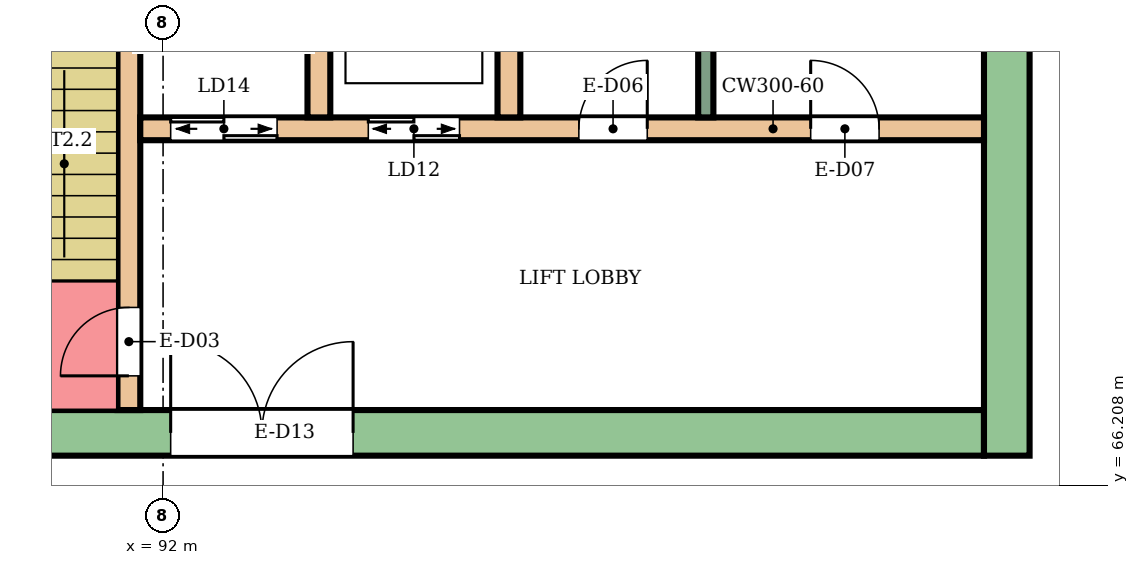
"""IFC4 building model, lengths in metres.
Left out: names, types, materials, properties, quantities, classifications, styles, units other than length and angle.
Written with IfcOpenShell. Run it as: python <this file> out.ifc"""

import sys

from ifc_helpers import new_model, si_unit, direction, frame, frame_2d, origin, place, context, subcontext, project, spatial, rectangle, extrude, element, fill, save


model = new_model("IFC4")
c1 = context("Model", 3, precision=1e-05, world=origin(), true_north=direction((0.0, 1.0)))
c2 = subcontext(c1, "Body", "Model", "MODEL_VIEW")
j1 = project(units=[si_unit("LENGTHUNIT", "METRE"), si_unit("PLANEANGLEUNIT", "RADIAN")], contexts=[c1])
p1 = place(None, origin())
s1 = spatial("IfcSite", under=j1, at=p1, CompositionType="ELEMENT")
p2 = place(p1, origin())
s2 = spatial("IfcBuilding", under=s1, at=p2, CompositionType="ELEMENT")
p3 = place(p2, frame((0.0, 0.0, 254.1)))
s3 = spatial("IfcBuildingStorey", under=s2, at=p3, CompositionType="ELEMENT", Elevation=254.1)
p4 = place(p3, frame((87.9, 66.9, 0.0), z_axis=(0.0, 0.0, 1.0), x_axis=(1.0, 0.0, 0.0)))
e1 = element("IfcWall", 1, at=p4, inside=s3, PredefinedType="SHEAR", context=c2, shape_type="SweptSolid", body=[
    extrude(rectangle(XDim=14.9, YDim=0.6, at=frame_2d((7.45, 0.0))), origin(), (0.0, 0.0, 1.0), 3.88),
])
p5 = place(p4, frame((4.2, 0.0, 0.0)))
e2 = element("IfcOpeningElement", 2, at=p5, cuts=e1, PredefinedType="OPENING", context=c2, shape_type="SweptSolid", body=[
    extrude(rectangle(XDim=2.4, YDim=2.4, at=frame_2d((1.2, 1.2))), frame((0.0, 0.31, 0.0), z_axis=(0.0, -1.0, 0.0), x_axis=(1.0, 0.0, 0.0)), (0.0, 0.0, 1.0), 0.62),
])
p6 = place(p3, frame((103.1, 66.6, 0.0), z_axis=(0.0, 0.0, 1.0), x_axis=(0.0, 1.0, 0.0)))
e3 = element("IfcWall", 3, at=p6, inside=s3, PredefinedType="SHEAR", context=c2, shape_type="SweptSolid", body=[
    extrude(rectangle(XDim=16.8, YDim=0.6, at=frame_2d((8.4, 0.0))), origin(), (0.0, 0.0, 1.0), 3.88),
])
p7 = place(p3, frame((91.55, 67.2, 0.0), z_axis=(0.0, 0.0, 1.0), x_axis=(0.0, 1.0, 0.0)))
e4 = element("IfcWall", 4, at=p7, inside=s3, PredefinedType="SHEAR", context=c2, shape_type="SweptSolid", body=[
    extrude(rectangle(XDim=7.8, YDim=0.3, at=frame_2d((3.9, 0.0))), origin(), (0.0, 0.0, 1.0), 3.88),
])
p8 = place(p7, frame((0.45, 0.0, 0.0)))
e5 = element("IfcOpeningElement", 5, at=p8, cuts=e4, PredefinedType="OPENING", context=c2, shape_type="SweptSolid", body=[
    extrude(rectangle(XDim=0.9, YDim=2.1, at=frame_2d((0.45, 1.05))), frame((0.0, 0.16, 0.0), z_axis=(0.0, -1.0, 0.0), x_axis=(1.0, 0.0, 0.0)), (0.0, 0.0, 1.0), 0.32),
])
p9 = place(p3, frame((91.7, 70.9, 0.0), z_axis=(0.0, 0.0, 1.0), x_axis=(1.0, 0.0, 0.0)))
e6 = element("IfcWall", 6, at=p9, inside=s3, PredefinedType="SHEAR", context=c2, shape_type="SweptSolid", body=[
    extrude(rectangle(XDim=11.1, YDim=0.3, at=frame_2d((5.55, 0.0))), origin(), (0.0, 0.0, 1.0), 3.88),
])
p10 = place(p9, frame((0.4, 0.0, 0.0)))
e7 = element("IfcOpeningElement", 7, at=p10, cuts=e6, PredefinedType="OPENING", context=c2, shape_type="SweptSolid", body=[
    extrude(rectangle(XDim=1.4, YDim=2.1, at=frame_2d((0.7, 1.05))), frame((0.0, 0.16, 0.0), z_axis=(0.0, -1.0, 0.0), x_axis=(1.0, 0.0, 0.0)), (0.0, 0.0, 1.0), 0.32),
])
p11 = place(p9, frame((3.0, 0.0, 0.0)))
e8 = element("IfcOpeningElement", 8, at=p11, cuts=e6, PredefinedType="OPENING", context=c2, shape_type="SweptSolid", body=[
    extrude(rectangle(XDim=1.2, YDim=2.1, at=frame_2d((0.6, 1.05))), frame((0.0, 0.16, 0.0), z_axis=(0.0, -1.0, 0.0), x_axis=(1.0, 0.0, 0.0)), (0.0, 0.0, 1.0), 0.32),
])
p12 = place(p9, frame((5.77, 0.0, 0.0)))
e9 = element("IfcOpeningElement", 9, at=p12, cuts=e6, PredefinedType="OPENING", context=c2, shape_type="SweptSolid", body=[
    extrude(rectangle(XDim=0.9, YDim=2.1, at=frame_2d((0.45, 1.05))), frame((0.0, 0.16, 0.0), z_axis=(0.0, -1.0, 0.0), x_axis=(1.0, 0.0, 0.0)), (0.0, 0.0, 1.0), 0.32),
])
p13 = place(p9, frame((8.82, 0.0, 0.0)))
e10 = element("IfcOpeningElement", 10, at=p13, cuts=e6, PredefinedType="OPENING", context=c2, shape_type="SweptSolid", body=[
    extrude(rectangle(XDim=0.9, YDim=2.1, at=frame_2d((0.45, 1.05))), frame((0.0, 0.16, 0.0), z_axis=(0.0, -1.0, 0.0), x_axis=(1.0, 0.0, 0.0)), (0.0, 0.0, 1.0), 0.32),
])
for number, where, z_axis, x_axis in (
    (11, (94.05, 71.05, 0.0), (0.0, 0.0, 1.0), (0.0, 1.0, 0.0)),
    (12, (96.55, 71.05, 0.0), (0.0, 0.0, 1.0), (0.0, 1.0, 0.0)),
):
    element("IfcWall", number, at=place(p3, frame(where, z_axis=z_axis, x_axis=x_axis)), inside=s3, PredefinedType="SHEAR", context=c2, shape_type="SweptSolid", body=[
        extrude(rectangle(XDim=2.55, YDim=0.3, at=frame_2d((1.275, 0.0))), origin(), (0.0, 0.0, 1.0), 3.88),
    ])
p14 = place(p3, frame((99.14, 71.05, 0.0), z_axis=(0.0, 0.0, 1.0), x_axis=(0.0, 1.0, 0.0)))
e13 = element("IfcWall", 13, at=p14, inside=s3, PredefinedType="PARTITIONING", context=c2, shape_type="SweptSolid", body=[
    extrude(rectangle(XDim=2.55, YDim=0.2, at=frame_2d((1.275, 0.0))), origin(), (0.0, 0.0, 1.0), 3.88),
])
p15 = place(p8, origin())
e14 = element("IfcDoor", 14, at=p15, inside=s3, OperationType="SINGLE_SWING_LEFT", PredefinedType="DOOR", context=c2, shape_type="SweptSolid", body=[
    extrude(rectangle(XDim=0.9, YDim=2.1, at=frame_2d((0.45, 1.05))), frame((0.0, 0.025, 0.0), z_axis=(0.0, -1.0, 0.0), x_axis=(1.0, 0.0, 0.0)), (0.0, 0.0, 1.0), 0.05),
])
fill(e5, e14)
p16 = place(p10, origin())
e15 = element("IfcDoor", 15, at=p16, inside=s3, OperationType="DOUBLE_DOOR_SLIDING", PredefinedType="DOOR", context=c2, shape_type="SweptSolid", body=[
    extrude(rectangle(XDim=1.4, YDim=2.1, at=frame_2d((0.7, 1.05))), frame((0.0, 0.025, 0.0), z_axis=(0.0, -1.0, 0.0), x_axis=(1.0, 0.0, 0.0)), (0.0, 0.0, 1.0), 0.05),
])
fill(e7, e15)
p17 = place(p11, origin())
e16 = element("IfcDoor", 16, at=p17, inside=s3, OperationType="DOUBLE_DOOR_SLIDING", PredefinedType="DOOR", context=c2, shape_type="SweptSolid", body=[
    extrude(rectangle(XDim=1.2, YDim=2.1, at=frame_2d((0.6, 1.05))), frame((0.0, 0.025, 0.0), z_axis=(0.0, -1.0, 0.0), x_axis=(1.0, 0.0, 0.0)), (0.0, 0.0, 1.0), 0.05),
])
fill(e8, e16)
p18 = place(p12, origin())
e17 = element("IfcDoor", 17, at=p18, inside=s3, OperationType="SINGLE_SWING_RIGHT", PredefinedType="DOOR", context=c2, shape_type="SweptSolid", body=[
    extrude(rectangle(XDim=0.9, YDim=2.1, at=frame_2d((0.45, 1.05))), frame((0.0, 0.025, 0.0), z_axis=(0.0, -1.0, 0.0), x_axis=(1.0, 0.0, 0.0)), (0.0, 0.0, 1.0), 0.05),
])
fill(e9, e17)
p19 = place(p13, origin())
e18 = element("IfcDoor", 18, at=p19, inside=s3, OperationType="SINGLE_SWING_LEFT", PredefinedType="DOOR", context=c2, shape_type="SweptSolid", body=[
    extrude(rectangle(XDim=0.9, YDim=2.1, at=frame_2d((0.45, 1.05))), frame((0.0, 0.025, 0.0), z_axis=(0.0, -1.0, 0.0), x_axis=(1.0, 0.0, 0.0)), (0.0, 0.0, 1.0), 0.05),
])
fill(e10, e18)
p20 = place(p5, origin())
e19 = element("IfcDoor", 19, at=p20, inside=s3, OperationType="DOUBLE_DOOR_SINGLE_SWING", PredefinedType="DOOR", context=c2, shape_type="SweptSolid", body=[
    extrude(rectangle(XDim=2.4, YDim=2.4, at=frame_2d((1.2, 1.2))), frame((0.0, 0.025, 0.0), z_axis=(0.0, -1.0, 0.0), x_axis=(1.0, 0.0, 0.0)), (0.0, 0.0, 1.0), 0.05),
])
fill(e2, e19)
save(model, sys.argv[1])
